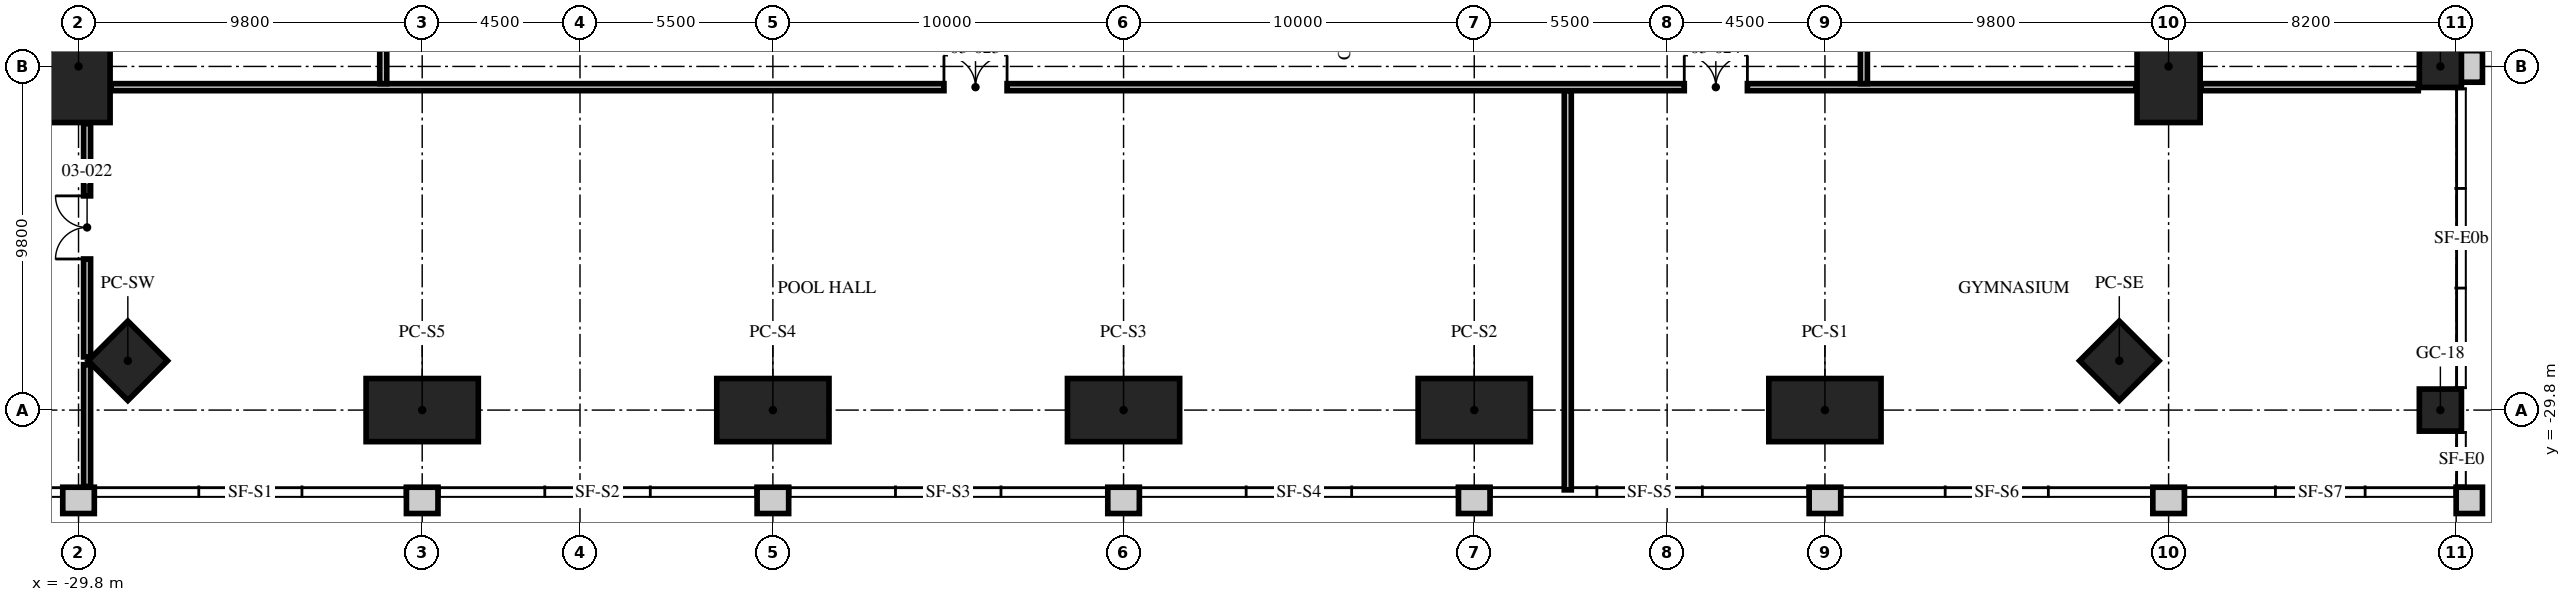
"""IFC4 building model, lengths in metres.
Left out: names, types, materials, properties, quantities, classifications, styles, units other than length and angle.
Written with IfcOpenShell. Run it as: python <this file> out.ifc"""

import sys

from ifc_helpers import new_model, si_unit, direction, frame, frame_2d, origin, origin_2d, place, context, subcontext, project, spatial, rectangle, hollow_rectangle, extrude, element, fill, save


model = new_model("IFC4")
c1 = context("Model", 3, precision=1e-05, world=origin(), true_north=direction((0.0, 1.0)))
c2 = subcontext(c1, "Body", "Model", "MODEL_VIEW")
j1 = project(units=[si_unit("LENGTHUNIT", "METRE"), si_unit("PLANEANGLEUNIT", "RADIAN")], contexts=[c1])
p1 = place(None, origin())
s1 = spatial("IfcSite", under=j1, at=p1, CompositionType="ELEMENT")
p2 = place(p1, origin())
s2 = spatial("IfcBuilding", under=s1, at=p2, CompositionType="ELEMENT")
p3 = place(p2, frame((0.0, 0.0, 16.0)))
s3 = spatial("IfcBuildingStorey", under=s2, at=p3, CompositionType="ELEMENT", Elevation=16.0)
for number, where, z_axis, x_axis in (
    (1, (29.8, -20.0, 0.0), (0.0, 0.0, 1.0), (0.0, 1.0, 0.0)),
    (2, (20.0, -29.8, 0.0), (0.0, 0.0, 1.0), (1.0, 0.0, 0.0)),
    (3, (10.0, -29.8, 0.0), (0.0, 0.0, 1.0), (1.0, 0.0, 0.0)),
    (4, (0.0, -29.8, 0.0), (0.0, 0.0, 1.0), (1.0, 0.0, 0.0)),
    (5, (-10.0, -29.8, 0.0), (0.0, 0.0, 1.0), (1.0, 0.0, 0.0)),
    (6, (-20.0, -29.8, 0.0), (0.0, 0.0, 1.0), (1.0, 0.0, 0.0)),
    (7, (-29.8, -20.0, 0.0), (0.0, 0.0, 1.0), (0.0, 1.0, 0.0)),
):
    element("IfcColumn", number, at=place(p3, frame(where, z_axis=z_axis, x_axis=x_axis)), inside=s3, PredefinedType="COLUMN", context=c2, shape_type="SweptSolid", body=[
        extrude(hollow_rectangle(XDim=3.2, YDim=1.8, WallThickness=0.2, at=origin_2d()), origin(), (0.0, 0.0, 1.0), 5.0),
    ])
for number, where, z_axis, x_axis in (
    (8, (28.394, -28.394, 0.0), (0.0, 0.0, 1.0), (0.707, 0.707, 0.0)),
    (9, (-28.394, -28.394, 0.0), (0.0, 0.0, 1.0), (0.707, -0.707, 0.0)),
):
    element("IfcColumn", number, at=place(p3, frame(where, z_axis=z_axis, x_axis=x_axis)), inside=s3, PredefinedType="COLUMN", context=c2, shape_type="SweptSolid", body=[
        extrude(hollow_rectangle(XDim=1.6, YDim=1.6, WallThickness=0.1, at=origin_2d()), origin(), (0.0, 0.0, 1.0), 5.0),
    ])
for number, where, z_axis, x_axis in (
    (10, (37.55, -29.8, 0.0), (0.0, 0.0, 1.0), (1.0, 0.0, 0.0)),
    (11, (37.55, -20.0, 0.0), (0.0, 0.0, 1.0), (1.0, 0.0, 0.0)),
):
    element("IfcColumn", number, at=place(p3, frame(where, z_axis=z_axis, x_axis=x_axis)), inside=s3, PredefinedType="COLUMN", context=c2, shape_type="SweptSolid", body=[
        extrude(rectangle(XDim=1.2, YDim=1.2, at=origin_2d()), origin(), (0.0, 0.0, 1.0), 5.0),
    ])
for number, where, z_axis, x_axis in (
    (12, (-30.25, -32.375, 0.0), (0.0, 0.0, 1.0), (1.0, 0.0, 0.0)),
    (13, (-20.45, -32.375, 0.0), (0.0, 0.0, 1.0), (1.0, 0.0, 0.0)),
    (14, (-10.45, -32.375, 0.0), (0.0, 0.0, 1.0), (1.0, 0.0, 0.0)),
    (15, (-0.45, -32.375, 0.0), (0.0, 0.0, 1.0), (1.0, 0.0, 0.0)),
    (16, (9.55, -32.375, 0.0), (0.0, 0.0, 1.0), (1.0, 0.0, 0.0)),
    (17, (19.55, -32.375, 0.0), (0.0, 0.0, 1.0), (1.0, 0.0, 0.0)),
    (18, (29.35, -32.375, 0.0), (0.0, 0.0, 1.0), (1.0, 0.0, 0.0)),
):
    element("IfcWall", number, at=place(p3, frame(where, z_axis=z_axis, x_axis=x_axis)), inside=s3, PredefinedType="SOLIDWALL", context=c2, shape_type="SweptSolid", body=[
        extrude(rectangle(XDim=0.9, YDim=0.75, at=frame_2d((0.45, 0.0))), origin(), (0.0, 0.0, 1.0), 5.0),
    ])
p4 = place(p3, frame((38.0, -32.375, 0.0), z_axis=(0.0, 0.0, 1.0), x_axis=(1.0, 0.0, 0.0)))
e19 = element("IfcWall", 19, at=p4, inside=s3, PredefinedType="SOLIDWALL", context=c2, shape_type="SweptSolid", body=[
    extrude(rectangle(XDim=0.75, YDim=0.75, at=frame_2d((0.375, 0.0))), origin(), (0.0, 0.0, 1.0), 5.0),
])
p5 = place(p3, frame((38.375, -20.45, 0.0), z_axis=(0.0, 0.0, 1.0), x_axis=(0.0, 1.0, 0.0)))
e20 = element("IfcWall", 20, at=p5, inside=s3, PredefinedType="SOLIDWALL", context=c2, shape_type="SweptSolid", body=[
    extrude(rectangle(XDim=0.9, YDim=0.75, at=frame_2d((0.45, 0.0))), origin(), (0.0, 0.0, 1.0), 5.0),
])
p6 = place(p3, frame((12.667, -32.075, 0.0), z_axis=(0.0, 0.0, 1.0), x_axis=(0.0, 1.0, 0.0)))
e21 = element("IfcWall", 21, at=p6, inside=s3, PredefinedType="SOLIDWALL", context=c2, shape_type="SweptSolid", body=[
    extrude(rectangle(XDim=11.384, YDim=0.2, at=frame_2d((5.692, 0.0))), origin(), (0.0, 0.0, 1.0), 3.96),
])
p7 = place(p3, frame((-29.556, -31.98, 0.0), z_axis=(0.0, 0.0, 1.0), x_axis=(0.0, 1.0, 0.0)))
e22 = element("IfcWall", 22, at=p7, inside=s3, PredefinedType="SOLIDWALL", context=c2, shape_type="SweptSolid", body=[
    extrude(rectangle(XDim=3.475, YDim=0.2, at=frame_2d((1.737, 0.0))), origin(), (0.0, 0.0, 1.0), 4.75),
])
p8 = place(p3, frame((-29.556, -28.283, 0.0), z_axis=(0.0, 0.0, 1.0), x_axis=(0.0, 1.0, 0.0)))
e23 = element("IfcWall", 23, at=p8, inside=s3, PredefinedType="SOLIDWALL", context=c2, shape_type="SweptSolid", body=[
    extrude(rectangle(XDim=6.653, YDim=0.2, at=frame_2d((3.326, 0.0))), origin(), (0.0, 0.0, 1.0), 3.96),
])
p9 = place(p8, frame((2.792, 0.0, 0.0)))
e24 = element("IfcOpeningElement", 24, at=p9, cuts=e23, PredefinedType="OPENING", context=c2, shape_type="SweptSolid", body=[
    extrude(rectangle(XDim=1.8, YDim=2.4, at=frame_2d((0.9, 1.2))), frame((0.0, 0.11, 0.0), z_axis=(0.0, -1.0, 0.0), x_axis=(1.0, 0.0, 0.0)), (0.0, 0.0, 1.0), 0.22),
])
p10 = place(p3, frame((-28.87, -20.591, 0.0), z_axis=(0.0, 0.0, 1.0), x_axis=(1.0, 0.0, 0.0)))
e25 = element("IfcWall", 25, at=p10, inside=s3, PredefinedType="SOLIDWALL", context=c2, shape_type="SweptSolid", body=[
    extrude(rectangle(XDim=57.74, YDim=0.2, at=frame_2d((28.87, 0.0))), origin(), (0.0, 0.0, 1.0), 3.55),
])
p11 = place(p10, frame((23.748, 0.0, 0.0)))
e26 = element("IfcOpeningElement", 26, at=p11, cuts=e25, PredefinedType="OPENING", context=c2, shape_type="SweptSolid", body=[
    extrude(rectangle(XDim=1.8, YDim=2.4, at=frame_2d((0.9, 1.2))), frame((0.0, 0.11, 0.0), z_axis=(0.0, -1.0, 0.0), x_axis=(1.0, 0.0, 0.0)), (0.0, 0.0, 1.0), 0.22),
])
p12 = place(p10, frame((44.859, 0.0, 0.0)))
e27 = element("IfcOpeningElement", 27, at=p12, cuts=e25, PredefinedType="OPENING", context=c2, shape_type="SweptSolid", body=[
    extrude(rectangle(XDim=1.8, YDim=2.4, at=frame_2d((0.9, 1.2))), frame((0.0, 0.11, 0.0), z_axis=(0.0, -1.0, 0.0), x_axis=(1.0, 0.0, 0.0)), (0.0, 0.0, 1.0), 0.22),
])
p13 = place(p3, frame((30.73, -20.591, 0.0), z_axis=(0.0, 0.0, 1.0), x_axis=(1.0, 0.0, 0.0)))
e28 = element("IfcWall", 28, at=p13, inside=s3, PredefinedType="SOLIDWALL", context=c2, shape_type="SweptSolid", body=[
    extrude(rectangle(XDim=6.19, YDim=0.2, at=frame_2d((3.095, 0.0))), origin(), (0.0, 0.0, 1.0), 4.75),
])
p14 = place(p3, frame((-21.111, -20.491, 0.0), z_axis=(0.0, 0.0, 1.0), x_axis=(0.0, 1.0, 0.0)))
e29 = element("IfcWall", 29, at=p14, inside=s3, PredefinedType="SOLIDWALL", context=c2, shape_type="SweptSolid", body=[
    extrude(rectangle(XDim=42.022, YDim=0.2, at=frame_2d((21.011, 0.0))), origin(), (0.0, 0.0, 1.0), 3.55),
])
p15 = place(p14, frame((3.613, 0.0, 0.0)))
e30 = element("IfcOpeningElement", 30, at=p15, cuts=e29, PredefinedType="OPENING", context=c2, shape_type="SweptSolid", body=[
    extrude(rectangle(XDim=1.0, YDim=2.1, at=frame_2d((0.5, 1.05))), frame((0.0, 0.11, 0.0), z_axis=(0.0, -1.0, 0.0), x_axis=(1.0, 0.0, 0.0)), (0.0, 0.0, 1.0), 0.22),
])
p16 = place(p14, frame((13.314, 0.0, 0.0)))
e31 = element("IfcOpeningElement", 31, at=p16, cuts=e29, PredefinedType="OPENING", context=c2, shape_type="SweptSolid", body=[
    extrude(rectangle(XDim=1.0, YDim=2.1, at=frame_2d((0.5, 1.05))), frame((0.0, 0.11, 0.0), z_axis=(0.0, -1.0, 0.0), x_axis=(1.0, 0.0, 0.0)), (0.0, 0.0, 1.0), 0.22),
])
p17 = place(p14, frame((24.499, 0.0, 0.0)))
e32 = element("IfcOpeningElement", 32, at=p17, cuts=e29, PredefinedType="OPENING", context=c2, shape_type="SweptSolid", body=[
    extrude(rectangle(XDim=1.0, YDim=2.1, at=frame_2d((0.5, 1.05))), frame((0.0, 0.11, 0.0), z_axis=(0.0, -1.0, 0.0), x_axis=(1.0, 0.0, 0.0)), (0.0, 0.0, 1.0), 0.22),
])
p18 = place(p14, frame((35.907, 0.0, 0.0)))
e33 = element("IfcOpeningElement", 33, at=p18, cuts=e29, PredefinedType="OPENING", context=c2, shape_type="SweptSolid", body=[
    extrude(rectangle(XDim=1.0, YDim=2.1, at=frame_2d((0.5, 1.05))), frame((0.0, 0.11, 0.0), z_axis=(0.0, -1.0, 0.0), x_axis=(1.0, 0.0, 0.0)), (0.0, 0.0, 1.0), 0.22),
])
p19 = place(p3, frame((21.111, -20.491, 0.0), z_axis=(0.0, 0.0, 1.0), x_axis=(0.0, 1.0, 0.0)))
e34 = element("IfcWall", 34, at=p19, inside=s3, PredefinedType="SOLIDWALL", context=c2, shape_type="SweptSolid", body=[
    extrude(rectangle(XDim=42.022, YDim=0.2, at=frame_2d((21.011, 0.0))), origin(), (0.0, 0.0, 1.0), 3.55),
])
p20 = place(p19, frame((5.962, 0.0, 0.0)))
e35 = element("IfcOpeningElement", 35, at=p20, cuts=e34, PredefinedType="OPENING", context=c2, shape_type="SweptSolid", body=[
    extrude(rectangle(XDim=1.8, YDim=2.4, at=frame_2d((0.9, 1.2))), frame((0.0, 0.11, 0.0), z_axis=(0.0, -1.0, 0.0), x_axis=(1.0, 0.0, 0.0)), (0.0, 0.0, 1.0), 0.22),
])
p21 = place(p19, frame((18.629, 0.0, 0.0)))
e36 = element("IfcOpeningElement", 36, at=p21, cuts=e34, PredefinedType="OPENING", context=c2, shape_type="SweptSolid", body=[
    extrude(rectangle(XDim=1.8, YDim=2.4, at=frame_2d((0.9, 1.2))), frame((0.0, 0.11, 0.0), z_axis=(0.0, -1.0, 0.0), x_axis=(1.0, 0.0, 0.0)), (0.0, 0.0, 1.0), 0.22),
])
p22 = place(p19, frame((27.363, 0.0, 0.0)))
e37 = element("IfcOpeningElement", 37, at=p22, cuts=e34, PredefinedType="OPENING", context=c2, shape_type="SweptSolid", body=[
    extrude(rectangle(XDim=1.0, YDim=2.1, at=frame_2d((0.5, 1.05))), frame((0.0, 0.11, 0.0), z_axis=(0.0, -1.0, 0.0), x_axis=(1.0, 0.0, 0.0)), (0.0, 0.0, 1.0), 0.22),
])
p23 = place(p19, frame((37.4, 0.0, 0.0)))
e38 = element("IfcOpeningElement", 38, at=p23, cuts=e34, PredefinedType="OPENING", context=c2, shape_type="SweptSolid", body=[
    extrude(rectangle(XDim=1.0, YDim=2.1, at=frame_2d((0.5, 1.05))), frame((0.0, 0.11, 0.0), z_axis=(0.0, -1.0, 0.0), x_axis=(1.0, 0.0, 0.0)), (0.0, 0.0, 1.0), 0.22),
])
p24 = place(p19, frame((31.584, 0.0, 0.0)))
e39 = element("IfcOpeningElement", 39, at=p24, cuts=e34, PredefinedType="OPENING", context=c2, shape_type="SweptSolid", body=[
    extrude(rectangle(XDim=1.0, YDim=2.1, at=frame_2d((0.5, 1.05))), frame((0.0, 0.11, 0.0), z_axis=(0.0, -1.0, 0.0), x_axis=(1.0, 0.0, 0.0)), (0.0, 0.0, 1.0), 0.22),
])
p25 = place(p9, origin())
e40 = element("IfcDoor", 40, at=p25, inside=s3, OperationType="DOUBLE_DOOR_SINGLE_SWING", PredefinedType="DOOR", context=c2, shape_type="SweptSolid", body=[
    extrude(rectangle(XDim=1.8, YDim=2.4, at=frame_2d((0.9, 1.2))), frame((0.0, 0.025, 0.0), z_axis=(0.0, -1.0, 0.0), x_axis=(1.0, 0.0, 0.0)), (0.0, 0.0, 1.0), 0.05),
])
fill(e24, e40)
p26 = place(p11, origin())
e41 = element("IfcDoor", 41, at=p26, inside=s3, OperationType="DOUBLE_DOOR_SINGLE_SWING", PredefinedType="DOOR", context=c2, shape_type="SweptSolid", body=[
    extrude(rectangle(XDim=1.8, YDim=2.4, at=frame_2d((0.9, 1.2))), frame((0.0, 0.025, 0.0), z_axis=(0.0, -1.0, 0.0), x_axis=(1.0, 0.0, 0.0)), (0.0, 0.0, 1.0), 0.05),
])
fill(e26, e41)
p27 = place(p12, origin())
e42 = element("IfcDoor", 42, at=p27, inside=s3, OperationType="DOUBLE_DOOR_SINGLE_SWING", PredefinedType="DOOR", context=c2, shape_type="SweptSolid", body=[
    extrude(rectangle(XDim=1.8, YDim=2.4, at=frame_2d((0.9, 1.2))), frame((0.0, 0.025, 0.0), z_axis=(0.0, -1.0, 0.0), x_axis=(1.0, 0.0, 0.0)), (0.0, 0.0, 1.0), 0.05),
])
fill(e27, e42)
save(model, sys.argv[1])
